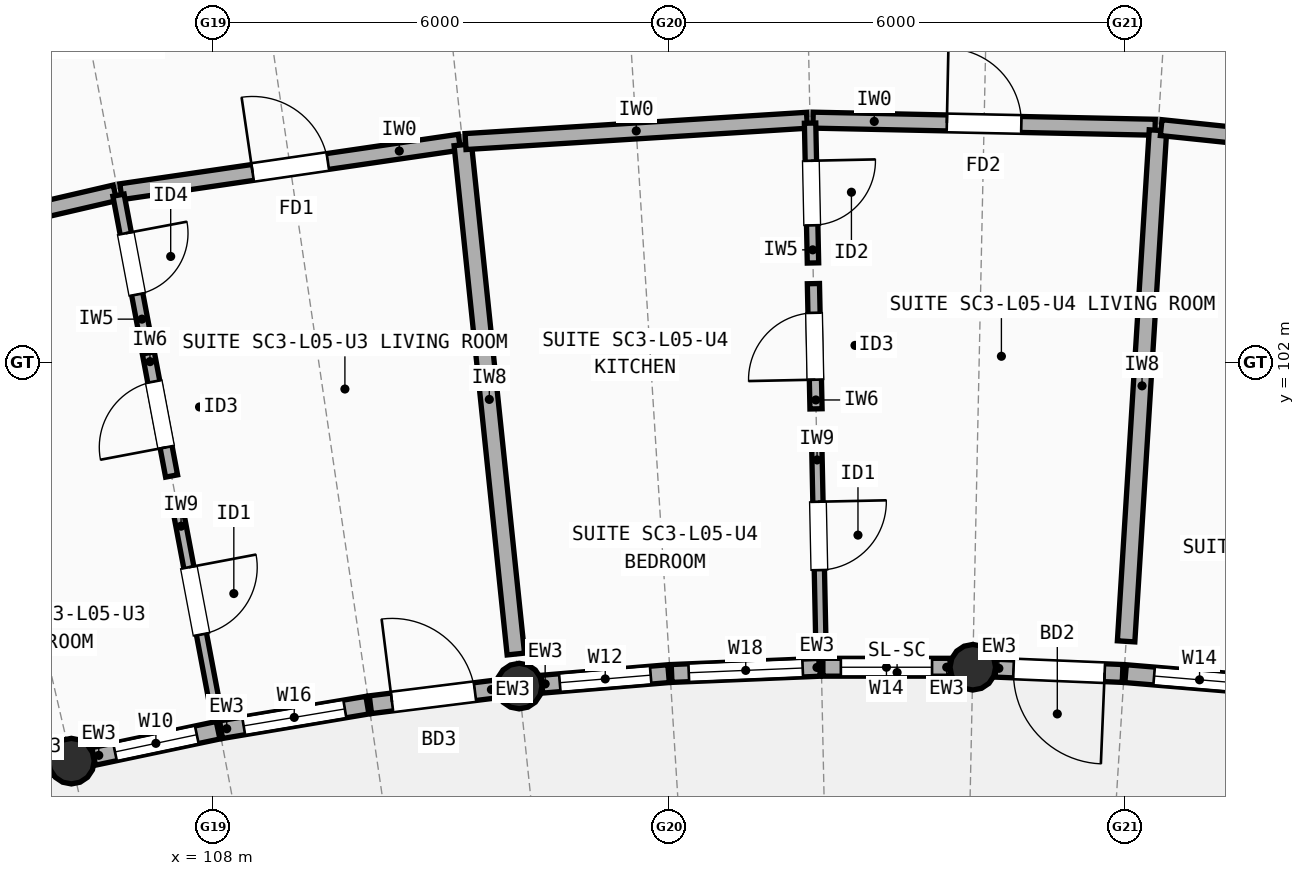
"""IFC4 building model, lengths in metres.
Left out: names, types, materials, properties, quantities, classifications, styles, units other than length and angle.
Written with IfcOpenShell. Run it as: python <this file> out.ifc"""

import sys

from ifc_helpers import new_model, si_unit, direction, frame, frame_2d, origin, origin_2d, place, context, subcontext, project, spatial, rectangle, circle, extrude, element, fill, save


model = new_model("IFC4")
c1 = context("Model", 3, precision=1e-05, world=origin(), true_north=direction((0.0, 1.0)))
c2 = subcontext(c1, "Body", "Model", "MODEL_VIEW")
j1 = project(units=[si_unit("LENGTHUNIT", "METRE"), si_unit("PLANEANGLEUNIT", "RADIAN")], contexts=[c1])
p1 = place(None, origin())
s1 = spatial("IfcSite", under=j1, at=p1, CompositionType="ELEMENT")
p2 = place(p1, origin())
s2 = spatial("IfcBuilding", under=s1, at=p2, CompositionType="ELEMENT")
p3 = place(p2, frame((0.0, 0.0, 17.3)))
s3 = spatial("IfcBuildingStorey", under=s2, at=p3, CompositionType="ELEMENT", Elevation=17.3)
for number, where, z_axis, x_axis in (
    (1, (106.136, 96.754, 0.0), (0.0, 0.0, 1.0), (1.0, 0.0, 0.0)),
    (2, (112.028, 97.742, 0.0), (0.0, 0.0, 1.0), (1.0, 0.0, 0.0)),
    (3, (117.996, 97.99, 0.0), (0.0, 0.0, 1.0), (1.0, 0.0, 0.0)),
):
    element("IfcColumn", number, at=place(p3, frame(where, z_axis=z_axis, x_axis=x_axis)), inside=s3, PredefinedType="COLUMN", context=c2, shape_type="SweptSolid", body=[
        extrude(circle(Radius=0.3, at=origin_2d()), origin(), (0.0, 0.0, 1.0), 2.94),
    ])
p4 = place(p3, frame((106.43, 96.816, 0.0), z_axis=(0.0, 0.0, 1.0), x_axis=(0.978524995622, 0.206128195408, 0.0)))
e4 = element("IfcWall", 4, at=p4, inside=s3, PredefinedType="STANDARD", context=c2, shape_type="SweptSolid", body=[
    extrude(rectangle(XDim=1.672, YDim=0.235, at=frame_2d((0.836, 0.0))), origin(), (0.0, 0.0, 1.0), 2.676),
])
p5 = place(p4, frame((0.286, 0.0, 0.85)))
e5 = element("IfcOpeningElement", 5, at=p5, cuts=e4, PredefinedType="OPENING", context=c2, shape_type="SweptSolid", body=[
    extrude(rectangle(XDim=1.1, YDim=1.45, at=frame_2d((0.55, 0.725))), frame((0.0, 0.127, 0.0), z_axis=(0.0, -1.0, 0.0), x_axis=(1.0, 0.0, 0.0)), (0.0, 0.0, 1.0), 0.255),
])
p6 = place(p3, frame((108.105, 97.168, 0.0), z_axis=(0.0, 0.0, 1.0), x_axis=(0.986241418229, 0.165311418144, 0.0)))
e6 = element("IfcWall", 6, at=p6, inside=s3, PredefinedType="STANDARD", context=c2, shape_type="SweptSolid", body=[
    extrude(rectangle(XDim=1.952, YDim=0.235, at=frame_2d((0.976, 0.0))), origin(), (0.0, 0.0, 1.0), 2.676),
])
p7 = place(p6, frame((0.301, 0.0, 0.85)))
e7 = element("IfcOpeningElement", 7, at=p7, cuts=e6, PredefinedType="OPENING", context=c2, shape_type="SweptSolid", body=[
    extrude(rectangle(XDim=1.35, YDim=1.5, at=frame_2d((0.675, 0.75))), frame((0.0, 0.127, 0.0), z_axis=(0.0, -1.0, 0.0), x_axis=(1.0, 0.0, 0.0)), (0.0, 0.0, 1.0), 0.255),
])
p8 = place(p3, frame((110.071, 97.497, 0.0), z_axis=(0.0, 0.0, 1.0), x_axis=(0.992253152049, 0.124232371987, 0.0)))
e8 = element("IfcWall", 8, at=p8, inside=s3, PredefinedType="STANDARD", context=c2, shape_type="SweptSolid", body=[
    extrude(rectangle(XDim=1.672, YDim=0.235, at=frame_2d((0.836, 0.0))), origin(), (0.0, 0.0, 1.0), 2.676),
])
p9 = place(p8, frame((0.286, 0.0, 0.0)))
e9 = element("IfcOpeningElement", 9, at=p9, cuts=e8, PredefinedType="OPENING", context=c2, shape_type="SweptSolid", body=[
    extrude(rectangle(XDim=1.1, YDim=2.15, at=frame_2d((0.55, 1.075))), frame((0.0, 0.127, 0.0), z_axis=(0.0, -1.0, 0.0), x_axis=(1.0, 0.0, 0.0)), (0.0, 0.0, 1.0), 0.255),
])
p10 = place(p3, frame((112.327, 97.767, 0.0), z_axis=(0.0, 0.0, 1.0), x_axis=(0.996556823189, 0.082912593463, 0.0)))
e10 = element("IfcWall", 10, at=p10, inside=s3, PredefinedType="STANDARD", context=c2, shape_type="SweptSolid", body=[
    extrude(rectangle(XDim=1.673, YDim=0.235, at=frame_2d((0.836, 0.0))), origin(), (0.0, 0.0, 1.0), 2.676),
])
p11 = place(p10, frame((0.236, 0.0, 0.85)))
e11 = element("IfcOpeningElement", 11, at=p11, cuts=e10, PredefinedType="OPENING", context=c2, shape_type="SweptSolid", body=[
    extrude(rectangle(XDim=1.2, YDim=1.35, at=frame_2d((0.6, 0.675))), frame((0.0, 0.127, 0.0), z_axis=(0.0, -1.0, 0.0), x_axis=(1.0, 0.0, 0.0)), (0.0, 0.0, 1.0), 0.255),
])
p12 = place(p3, frame((114.033, 97.908, 0.0), z_axis=(0.0, 0.0, 1.0), x_axis=(0.999132639597, 0.041640947307, 0.0)))
e12 = element("IfcWall", 12, at=p12, inside=s3, PredefinedType="STANDARD", context=c2, shape_type="SweptSolid", body=[
    extrude(rectangle(XDim=1.952, YDim=0.235, at=frame_2d((0.976, 0.0))), origin(), (0.0, 0.0, 1.0), 2.676),
])
p13 = place(p12, frame((0.226, 0.0, 0.85)))
e13 = element("IfcOpeningElement", 13, at=p13, cuts=e12, PredefinedType="OPENING", context=c2, shape_type="SweptSolid", body=[
    extrude(rectangle(XDim=1.5, YDim=1.4, at=frame_2d((0.75, 0.7))), frame((0.0, 0.127, 0.0), z_axis=(0.0, -1.0, 0.0), x_axis=(1.0, 0.0, 0.0)), (0.0, 0.0, 1.0), 0.255),
])
p14 = place(p3, frame((116.024, 97.99, 0.0), z_axis=(0.0, 0.0, 1.0), x_axis=(1.0, 0.0, 0.0)))
e14 = element("IfcWall", 14, at=p14, inside=s3, PredefinedType="STANDARD", context=c2, shape_type="SweptSolid", body=[
    extrude(rectangle(XDim=1.673, YDim=0.235, at=frame_2d((0.836, 0.0))), origin(), (0.0, 0.0, 1.0), 2.676),
])
p15 = place(p14, frame((0.236, 0.0, 0.85)))
e15 = element("IfcOpeningElement", 15, at=p15, cuts=e14, PredefinedType="OPENING", context=c2, shape_type="SweptSolid", body=[
    extrude(rectangle(XDim=1.2, YDim=1.5, at=frame_2d((0.6, 0.75))), frame((0.0, 0.127, 0.0), z_axis=(0.0, -1.0, 0.0), x_axis=(1.0, 0.0, 0.0)), (0.0, 0.0, 1.0), 0.255),
])
p16 = place(p3, frame((118.296, 97.977, 0.0), z_axis=(0.0, 0.0, 1.0), x_axis=(0.999134084838, -0.041606255725, 0.0)))
e16 = element("IfcWall", 16, at=p16, inside=s3, PredefinedType="STANDARD", context=c2, shape_type="SweptSolid", body=[
    extrude(rectangle(XDim=1.672, YDim=0.235, at=frame_2d((0.836, 0.0))), origin(), (0.0, 0.0, 1.0), 2.676),
])
p17 = place(p16, frame((0.236, 0.0, 0.0)))
e17 = element("IfcOpeningElement", 17, at=p17, cuts=e16, PredefinedType="OPENING", context=c2, shape_type="SweptSolid", body=[
    extrude(rectangle(XDim=1.2, YDim=2.15, at=frame_2d((0.6, 1.075))), frame((0.0, 0.127, 0.0), z_axis=(0.0, -1.0, 0.0), x_axis=(1.0, 0.0, 0.0)), (0.0, 0.0, 1.0), 0.255),
])
p18 = place(p3, frame((120.007, 97.905, 0.0), z_axis=(0.0, 0.0, 1.0), x_axis=(0.996557820409, -0.082900606641, 0.0)))
e18 = element("IfcWall", 18, at=p18, inside=s3, PredefinedType="STANDARD", context=c2, shape_type="SweptSolid", body=[
    extrude(rectangle(XDim=1.953, YDim=0.235, at=frame_2d((0.976, 0.0))), origin(), (0.0, 0.0, 1.0), 2.676),
])
p19 = place(p18, frame((0.376, 0.0, 0.85)))
e19 = element("IfcOpeningElement", 19, at=p19, cuts=e18, PredefinedType="OPENING", context=c2, shape_type="SweptSolid", body=[
    extrude(rectangle(XDim=1.2, YDim=1.5, at=frame_2d((0.6, 0.75))), frame((0.0, 0.127, 0.0), z_axis=(0.0, -1.0, 0.0), x_axis=(1.0, 0.0, 0.0)), (0.0, 0.0, 1.0), 0.255),
])
p20 = place(p3, frame((102.325, 103.212, 0.0), z_axis=(0.0, 0.0, 1.0), x_axis=(0.974052809246, 0.226320844821, 0.0)))
e20 = element("IfcWall", 20, at=p20, inside=s3, PredefinedType="SOLIDWALL", context=c2, shape_type="SweptSolid", body=[
    extrude(rectangle(XDim=4.501, YDim=0.21, at=frame_2d((2.251, 0.0))), origin(), (0.0, 0.0, 1.0), 2.734),
])
p21 = place(p3, frame((106.788, 104.246, 0.0), z_axis=(0.0, 0.0, 1.0), x_axis=(0.98946769641, 0.14475385232, 0.0)))
e21 = element("IfcWall", 21, at=p21, inside=s3, PredefinedType="SOLIDWALL", context=c2, shape_type="SweptSolid", body=[
    extrude(rectangle(XDim=4.501, YDim=0.21, at=frame_2d((2.251, 0.0))), origin(), (0.0, 0.0, 1.0), 2.714),
])
p22 = place(p21, frame((1.751, 0.0, 0.0)))
e22 = element("IfcOpeningElement", 22, at=p22, cuts=e21, PredefinedType="OPENING", context=c2, shape_type="SweptSolid", body=[
    extrude(rectangle(XDim=1.0, YDim=2.15, at=frame_2d((0.5, 1.075))), frame((0.0, 0.115, 0.0), z_axis=(0.0, -1.0, 0.0), x_axis=(1.0, 0.0, 0.0)), (0.0, 0.0, 1.0), 0.23),
])
p23 = place(p3, frame((108.025, 97.487, 0.0), z_axis=(0.0, 0.0, 1.0), x_axis=(-0.185725576604, 0.982601653874, 0.0)))
e23 = element("IfcWall", 23, at=p23, inside=s3, PredefinedType="PARTITIONING", context=c2, shape_type="SweptSolid", body=[
    extrude(rectangle(XDim=2.8, YDim=0.135, at=frame_2d((1.4, 0.0))), origin(), (0.0, 0.0, 1.0), 2.754),
])
p24 = place(p23, frame((0.95, 0.0, 0.0)))
e24 = element("IfcOpeningElement", 24, at=p24, cuts=e23, PredefinedType="OPENING", context=c2, shape_type="SweptSolid", body=[
    extrude(rectangle(XDim=0.9, YDim=2.1, at=frame_2d((0.45, 1.05))), frame((0.0, 0.077, 0.0), z_axis=(0.0, -1.0, 0.0), x_axis=(1.0, 0.0, 0.0)), (0.0, 0.0, 1.0), 0.155),
])
p25 = place(p3, frame((107.454, 100.506, 0.0), z_axis=(0.0, 0.0, 1.0), x_axis=(-0.185764109712, 0.98259436979, 0.0)))
e25 = element("IfcWall", 25, at=p25, inside=s3, PredefinedType="PLUMBINGWALL", context=c2, shape_type="SweptSolid", body=[
    extrude(rectangle(XDim=1.648, YDim=0.16, at=frame_2d((0.824, 0.0))), origin(), (0.0, 0.0, 1.0), 2.754),
])
p26 = place(p25, frame((0.384, 0.0, 0.0)))
e26 = element("IfcOpeningElement", 26, at=p26, cuts=e25, PredefinedType="OPENING", context=c2, shape_type="SweptSolid", body=[
    extrude(rectangle(XDim=0.88, YDim=2.1, at=frame_2d((0.44, 1.05))), frame((0.0, 0.09, 0.0), z_axis=(0.0, -1.0, 0.0), x_axis=(1.0, 0.0, 0.0)), (0.0, 0.0, 1.0), 0.18),
])
p27 = place(p3, frame((107.098, 102.392, 0.0), z_axis=(0.0, 0.0, 1.0), x_axis=(-0.185746265255, 0.982597743201, 0.0)))
e27 = element("IfcWall", 27, at=p27, inside=s3, PredefinedType="PARTITIONING", context=c2, shape_type="SweptSolid", body=[
    extrude(rectangle(XDim=1.84, YDim=0.15, at=frame_2d((0.92, 0.0))), origin(), (0.0, 0.0, 1.0), 2.754),
])
p28 = place(p27, frame((0.51, 0.0, 0.0)))
e28 = element("IfcOpeningElement", 28, at=p28, cuts=e27, PredefinedType="OPENING", context=c2, shape_type="SweptSolid", body=[
    extrude(rectangle(XDim=0.82, YDim=2.08, at=frame_2d((0.41, 1.04))), frame((0.0, 0.085, 0.0), z_axis=(0.0, -1.0, 0.0), x_axis=(1.0, 0.0, 0.0)), (0.0, 0.0, 1.0), 0.17),
])
p29 = place(p3, frame((111.984, 98.164, 0.0), z_axis=(0.0, 0.0, 1.0), x_axis=(-0.10362251791, 0.994616696915, 0.0)))
e29 = element("IfcWall", 29, at=p29, inside=s3, PredefinedType="SOLIDWALL", context=c2, shape_type="SweptSolid", body=[
    extrude(rectangle(XDim=6.736, YDim=0.23, at=frame_2d((3.368, 0.0))), origin(), (0.0, 0.0, 1.0), 2.734),
])
p30 = place(p3, frame((111.322, 104.906, 0.0), z_axis=(0.0, 0.0, 1.0), x_axis=(0.998063116084, 0.062209455176, 0.0)))
e30 = element("IfcWall", 30, at=p30, inside=s3, PredefinedType="SOLIDWALL", context=c2, shape_type="SweptSolid", body=[
    extrude(rectangle(XDim=4.501, YDim=0.21, at=frame_2d((2.251, 0.0))), origin(), (0.0, 0.0, 1.0), 2.754),
])
p31 = place(p3, frame((115.894, 105.187, 0.0), z_axis=(0.0, 0.0, 1.0), x_axis=(0.999785356511, -0.020718129879, 0.0)))
e31 = element("IfcWall", 31, at=p31, inside=s3, PredefinedType="SOLIDWALL", context=c2, shape_type="SweptSolid", body=[
    extrude(rectangle(XDim=4.501, YDim=0.21, at=frame_2d((2.251, 0.0))), origin(), (0.0, 0.0, 1.0), 2.734),
])
p32 = place(p31, frame((1.761, 0.0, 0.0)))
e32 = element("IfcOpeningElement", 32, at=p32, cuts=e31, PredefinedType="OPENING", context=c2, shape_type="SweptSolid", body=[
    extrude(rectangle(XDim=0.98, YDim=2.15, at=frame_2d((0.49, 1.075))), frame((0.0, 0.115, 0.0), z_axis=(0.0, -1.0, 0.0), x_axis=(1.0, 0.0, 0.0)), (0.0, 0.0, 1.0), 0.23),
])
p33 = place(p3, frame((115.997, 98.318, 0.0), z_axis=(0.0, 0.0, 1.0), x_axis=(-0.02075255058, 0.999784642633, 0.0)))
e33 = element("IfcWall", 33, at=p33, inside=s3, PredefinedType="PARTITIONING", context=c2, shape_type="SweptSolid", body=[
    extrude(rectangle(XDim=2.8, YDim=0.135, at=frame_2d((1.4, 0.0))), origin(), (0.0, 0.0, 1.0), 2.714),
])
p34 = place(p33, frame((0.95, 0.0, 0.0)))
e34 = element("IfcOpeningElement", 34, at=p34, cuts=e33, PredefinedType="OPENING", context=c2, shape_type="SweptSolid", body=[
    extrude(rectangle(XDim=0.9, YDim=2.1, at=frame_2d((0.45, 1.05))), frame((0.0, 0.077, 0.0), z_axis=(0.0, -1.0, 0.0), x_axis=(1.0, 0.0, 0.0)), (0.0, 0.0, 1.0), 0.155),
])
p35 = place(p3, frame((115.933, 101.389, 0.0), z_axis=(0.0, 0.0, 1.0), x_axis=(-0.020887426075, 0.999781833918, 0.0)))
e35 = element("IfcWall", 35, at=p35, inside=s3, PredefinedType="PLUMBINGWALL", context=c2, shape_type="SweptSolid", body=[
    extrude(rectangle(XDim=1.648, YDim=0.16, at=frame_2d((0.824, 0.0))), origin(), (0.0, 0.0, 1.0), 2.714),
])
p36 = place(p35, frame((0.384, 0.0, 0.0)))
e36 = element("IfcOpeningElement", 36, at=p36, cuts=e35, PredefinedType="OPENING", context=c2, shape_type="SweptSolid", body=[
    extrude(rectangle(XDim=0.88, YDim=2.1, at=frame_2d((0.44, 1.05))), frame((0.0, 0.09, 0.0), z_axis=(0.0, -1.0, 0.0), x_axis=(1.0, 0.0, 0.0)), (0.0, 0.0, 1.0), 0.18),
])
p37 = place(p3, frame((115.893, 103.309, 0.0), z_axis=(0.0, 0.0, 1.0), x_axis=(-0.020698948586, 0.999785753813, 0.0)))
e37 = element("IfcWall", 37, at=p37, inside=s3, PredefinedType="PARTITIONING", context=c2, shape_type="SweptSolid", body=[
    extrude(rectangle(XDim=1.84, YDim=0.15, at=frame_2d((0.92, 0.0))), origin(), (0.0, 0.0, 1.0), 2.714),
])
p38 = place(p37, frame((0.495, 0.0, 0.0)))
e38 = element("IfcOpeningElement", 38, at=p38, cuts=e37, PredefinedType="OPENING", context=c2, shape_type="SweptSolid", body=[
    extrude(rectangle(XDim=0.85, YDim=2.1, at=frame_2d((0.425, 1.05))), frame((0.0, 0.085, 0.0), z_axis=(0.0, -1.0, 0.0), x_axis=(1.0, 0.0, 0.0)), (0.0, 0.0, 1.0), 0.17),
])
p39 = place(p3, frame((120.013, 98.33, 0.0), z_axis=(0.0, 0.0, 1.0), x_axis=(0.062229364488, 0.998061874933, 0.0)))
e39 = element("IfcWall", 39, at=p39, inside=s3, PredefinedType="SOLIDWALL", context=c2, shape_type="SweptSolid", body=[
    extrude(rectangle(XDim=6.736, YDim=0.23, at=frame_2d((3.368, 0.0))), origin(), (0.0, 0.0, 1.0), 2.754),
])
p40 = place(p3, frame((120.475, 105.089, 0.0), z_axis=(0.0, 0.0, 1.0), x_axis=(0.994614565886, -0.103642970468, 0.0)))
e40 = element("IfcWall", 40, at=p40, inside=s3, PredefinedType="SOLIDWALL", context=c2, shape_type="SweptSolid", body=[
    extrude(rectangle(XDim=4.501, YDim=0.21, at=frame_2d((2.251, 0.0))), origin(), (0.0, 0.0, 1.0), 2.714),
])
p41 = place(p5, origin())
e41 = element("IfcWindow", 41, at=p41, inside=s3, PartitioningType="SINGLE_PANEL", PredefinedType="WINDOW", context=c2, shape_type="SweptSolid", body=[
    extrude(rectangle(XDim=1.1, YDim=1.45, at=frame_2d((0.55, 0.725))), frame((0.0, 0.03, 0.0), z_axis=(0.0, -1.0, 0.0), x_axis=(1.0, 0.0, 0.0)), (0.0, 0.0, 1.0), 0.06),
])
fill(e5, e41)
p42 = place(p7, origin())
e42 = element("IfcWindow", 42, at=p42, inside=s3, PartitioningType="SINGLE_PANEL", PredefinedType="WINDOW", context=c2, shape_type="SweptSolid", body=[
    extrude(rectangle(XDim=1.35, YDim=1.5, at=frame_2d((0.675, 0.75))), frame((0.0, 0.03, 0.0), z_axis=(0.0, -1.0, 0.0), x_axis=(1.0, 0.0, 0.0)), (0.0, 0.0, 1.0), 0.06),
])
fill(e7, e42)
p43 = place(p9, frame((1.1, 0.0, 0.0), z_axis=(0.0, 0.0, 1.0), x_axis=(-1.0, 0.0, 0.0)))
e43 = element("IfcDoor", 43, at=p43, inside=s3, OperationType="SINGLE_SWING_LEFT", PredefinedType="DOOR", context=c2, shape_type="SweptSolid", body=[
    extrude(rectangle(XDim=1.1, YDim=2.15, at=frame_2d((0.55, 1.075))), frame((0.0, 0.025, 0.0), z_axis=(0.0, -1.0, 0.0), x_axis=(1.0, 0.0, 0.0)), (0.0, 0.0, 1.0), 0.05),
])
fill(e9, e43)
p44 = place(p11, origin())
e44 = element("IfcWindow", 44, at=p44, inside=s3, PartitioningType="SINGLE_PANEL", PredefinedType="WINDOW", context=c2, shape_type="SweptSolid", body=[
    extrude(rectangle(XDim=1.2, YDim=1.35, at=frame_2d((0.6, 0.675))), frame((0.0, 0.03, 0.0), z_axis=(0.0, -1.0, 0.0), x_axis=(1.0, 0.0, 0.0)), (0.0, 0.0, 1.0), 0.06),
])
fill(e11, e44)
p45 = place(p13, origin())
e45 = element("IfcWindow", 45, at=p45, inside=s3, PartitioningType="SINGLE_PANEL", PredefinedType="WINDOW", context=c2, shape_type="SweptSolid", body=[
    extrude(rectangle(XDim=1.5, YDim=1.4, at=frame_2d((0.75, 0.7))), frame((0.0, 0.03, 0.0), z_axis=(0.0, -1.0, 0.0), x_axis=(1.0, 0.0, 0.0)), (0.0, 0.0, 1.0), 0.06),
])
fill(e13, e45)
p46 = place(p15, origin())
e46 = element("IfcWindow", 46, at=p46, inside=s3, PartitioningType="SINGLE_PANEL", PredefinedType="WINDOW", context=c2, shape_type="SweptSolid", body=[
    extrude(rectangle(XDim=1.2, YDim=1.5, at=frame_2d((0.6, 0.75))), frame((0.0, 0.03, 0.0), z_axis=(0.0, -1.0, 0.0), x_axis=(1.0, 0.0, 0.0)), (0.0, 0.0, 1.0), 0.06),
])
fill(e15, e46)
p47 = place(p17, frame((1.2, 0.0, 0.0), z_axis=(0.0, 0.0, 1.0), x_axis=(-1.0, 0.0, 0.0)))
e47 = element("IfcDoor", 47, at=p47, inside=s3, OperationType="SINGLE_SWING_RIGHT", PredefinedType="DOOR", context=c2, shape_type="SweptSolid", body=[
    extrude(rectangle(XDim=1.2, YDim=2.15, at=frame_2d((0.6, 1.075))), frame((0.0, 0.025, 0.0), z_axis=(0.0, -1.0, 0.0), x_axis=(1.0, 0.0, 0.0)), (0.0, 0.0, 1.0), 0.05),
])
fill(e17, e47)
p48 = place(p19, origin())
e48 = element("IfcWindow", 48, at=p48, inside=s3, PartitioningType="SINGLE_PANEL", PredefinedType="WINDOW", context=c2, shape_type="SweptSolid", body=[
    extrude(rectangle(XDim=1.2, YDim=1.5, at=frame_2d((0.6, 0.75))), frame((0.0, 0.03, 0.0), z_axis=(0.0, -1.0, 0.0), x_axis=(1.0, 0.0, 0.0)), (0.0, 0.0, 1.0), 0.06),
])
fill(e19, e48)
p49 = place(p22, origin())
e49 = element("IfcDoor", 49, at=p49, inside=s3, OperationType="SINGLE_SWING_LEFT", PredefinedType="DOOR", context=c2, shape_type="SweptSolid", body=[
    extrude(rectangle(XDim=1.0, YDim=2.15, at=frame_2d((0.5, 1.075))), frame((0.0, 0.025, 0.0), z_axis=(0.0, -1.0, 0.0), x_axis=(1.0, 0.0, 0.0)), (0.0, 0.0, 1.0), 0.05),
])
fill(e22, e49)
p50 = place(p24, origin())
e50 = element("IfcDoor", 50, at=p50, inside=s3, OperationType="SINGLE_SWING_RIGHT", PredefinedType="DOOR", context=c2, shape_type="SweptSolid", body=[
    extrude(rectangle(XDim=0.9, YDim=2.1, at=frame_2d((0.45, 1.05))), frame((0.0, 0.025, 0.0), z_axis=(0.0, -1.0, 0.0), x_axis=(1.0, 0.0, 0.0)), (0.0, 0.0, 1.0), 0.05),
])
fill(e24, e50)
p51 = place(p26, origin())
e51 = element("IfcDoor", 51, at=p51, inside=s3, OperationType="SINGLE_SWING_LEFT", PredefinedType="DOOR", context=c2, shape_type="SweptSolid", body=[
    extrude(rectangle(XDim=0.88, YDim=2.1, at=frame_2d((0.44, 1.05))), frame((0.0, 0.025, 0.0), z_axis=(0.0, -1.0, 0.0), x_axis=(1.0, 0.0, 0.0)), (0.0, 0.0, 1.0), 0.05),
])
fill(e26, e51)
p52 = place(p28, origin())
e52 = element("IfcDoor", 52, at=p52, inside=s3, OperationType="SINGLE_SWING_RIGHT", PredefinedType="DOOR", context=c2, shape_type="SweptSolid", body=[
    extrude(rectangle(XDim=0.82, YDim=2.08, at=frame_2d((0.41, 1.04))), frame((0.0, 0.025, 0.0), z_axis=(0.0, -1.0, 0.0), x_axis=(1.0, 0.0, 0.0)), (0.0, 0.0, 1.0), 0.05),
])
fill(e28, e52)
p53 = place(p32, origin())
e53 = element("IfcDoor", 53, at=p53, inside=s3, OperationType="SINGLE_SWING_LEFT", PredefinedType="DOOR", context=c2, shape_type="SweptSolid", body=[
    extrude(rectangle(XDim=0.98, YDim=2.15, at=frame_2d((0.49, 1.075))), frame((0.0, 0.025, 0.0), z_axis=(0.0, -1.0, 0.0), x_axis=(1.0, 0.0, 0.0)), (0.0, 0.0, 1.0), 0.05),
])
fill(e32, e53)
p54 = place(p34, origin())
e54 = element("IfcDoor", 54, at=p54, inside=s3, OperationType="SINGLE_SWING_RIGHT", PredefinedType="DOOR", context=c2, shape_type="SweptSolid", body=[
    extrude(rectangle(XDim=0.9, YDim=2.1, at=frame_2d((0.45, 1.05))), frame((0.0, 0.025, 0.0), z_axis=(0.0, -1.0, 0.0), x_axis=(1.0, 0.0, 0.0)), (0.0, 0.0, 1.0), 0.05),
])
fill(e34, e54)
p55 = place(p36, origin())
e55 = element("IfcDoor", 55, at=p55, inside=s3, OperationType="SINGLE_SWING_LEFT", PredefinedType="DOOR", context=c2, shape_type="SweptSolid", body=[
    extrude(rectangle(XDim=0.88, YDim=2.1, at=frame_2d((0.44, 1.05))), frame((0.0, 0.025, 0.0), z_axis=(0.0, -1.0, 0.0), x_axis=(1.0, 0.0, 0.0)), (0.0, 0.0, 1.0), 0.05),
])
fill(e36, e55)
p56 = place(p38, origin())
e56 = element("IfcDoor", 56, at=p56, inside=s3, OperationType="SINGLE_SWING_RIGHT", PredefinedType="DOOR", context=c2, shape_type="SweptSolid", body=[
    extrude(rectangle(XDim=0.85, YDim=2.1, at=frame_2d((0.425, 1.05))), frame((0.0, 0.025, 0.0), z_axis=(0.0, -1.0, 0.0), x_axis=(1.0, 0.0, 0.0)), (0.0, 0.0, 1.0), 0.05),
])
fill(e38, e56)
save(model, sys.argv[1])
